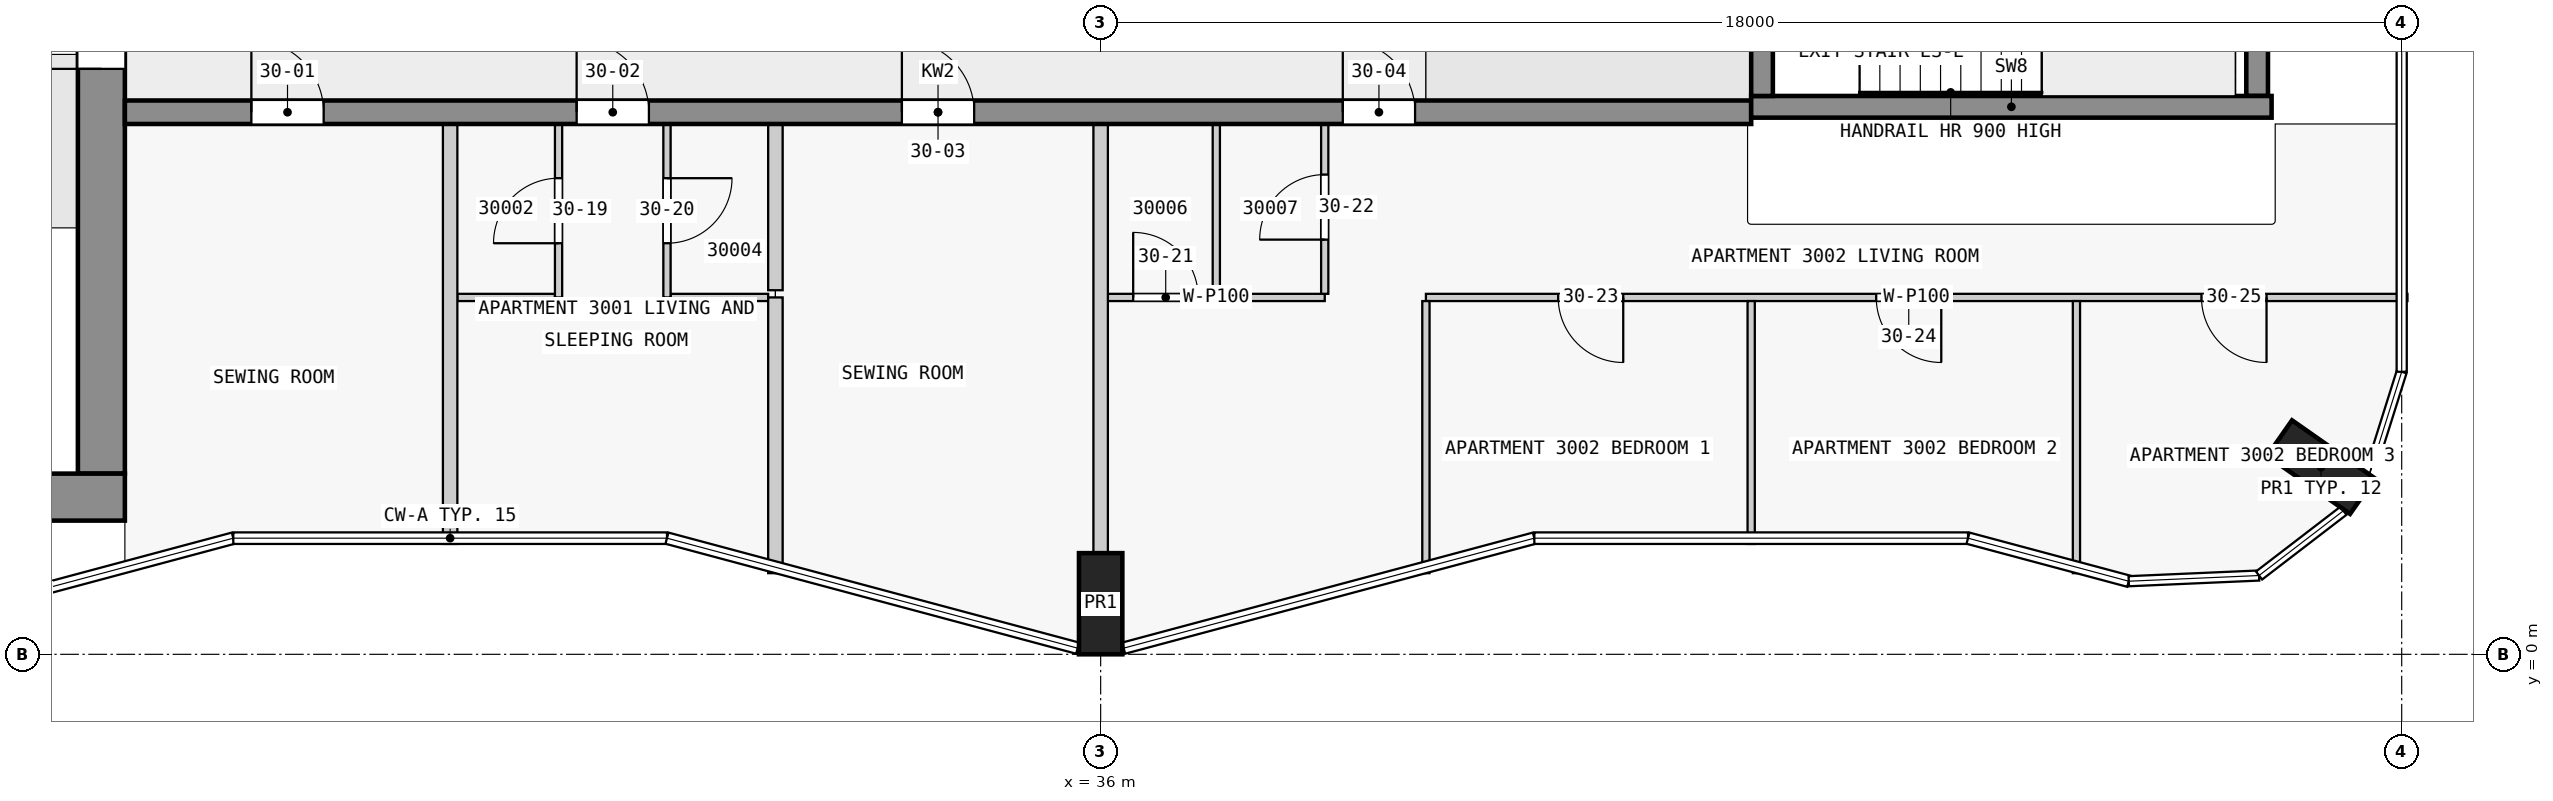
"""IFC4 building model, lengths in metres.
Left out: names, types, materials, properties, quantities, classifications, styles, units other than length and angle.
Written with IfcOpenShell. Run it as: python <this file> out.ifc"""

import sys

from ifc_helpers import new_model, si_unit, direction, frame, frame_2d, origin, origin_2d, place, context, subcontext, project, spatial, rectangle, extrude, element, fill, save


model = new_model("IFC4")
c1 = context("Model", 3, precision=1e-05, world=origin(), true_north=direction((0.0, 1.0)))
c2 = subcontext(c1, "Body", "Model", "MODEL_VIEW")
j1 = project(units=[si_unit("LENGTHUNIT", "METRE"), si_unit("PLANEANGLEUNIT", "RADIAN")], contexts=[c1])
p1 = place(None, origin())
s1 = spatial("IfcSite", under=j1, at=p1, CompositionType="ELEMENT")
p2 = place(p1, origin())
s2 = spatial("IfcBuilding", under=s1, at=p2, CompositionType="ELEMENT")
p3 = place(p2, frame((0.0, 0.0, 116.8)))
s3 = spatial("IfcBuildingStorey", under=s2, at=p3, CompositionType="ELEMENT", Elevation=116.8)
for number, where, z_axis, x_axis in (
    (1, (36.0, 0.7, 0.0), (0.0, 0.0, 1.0), (1.0, 0.0, 0.0)),
    (2, (52.884, 2.59, 0.0), (0.0, 0.0, 1.0), (0.574, 0.819, 0.0)),
):
    element("IfcColumn", number, at=place(p3, frame(where, z_axis=z_axis, x_axis=x_axis)), inside=s3, PredefinedType="COLUMN", context=c2, shape_type="SweptSolid", body=[
        extrude(rectangle(XDim=0.6, YDim=1.4, at=origin_2d()), origin(), (0.0, 0.0, 1.0), 3.5),
    ])
p4 = place(p3, frame((1.65, 2.175, 0.0), z_axis=(0.0, 0.0, 1.0), x_axis=(1.0, 0.0, 0.0)))
e3 = element("IfcWall", 3, at=p4, inside=s3, PredefinedType="SHEAR", context=c2, shape_type="SweptSolid", body=[
    extrude(rectangle(XDim=20.85, YDim=0.65, at=frame_2d((10.425, 0.0))), origin(), (0.0, 0.0, 1.0), 3.25),
])
p5 = place(p3, frame((22.175, 2.5, 0.0), z_axis=(0.0, 0.0, 1.0), x_axis=(0.0, 1.0, 0.0)))
e4 = element("IfcWall", 4, at=p5, inside=s3, PredefinedType="SHEAR", context=c2, shape_type="SweptSolid", body=[
    extrude(rectangle(XDim=14.85, YDim=0.65, at=frame_2d((7.425, 0.0))), origin(), (0.0, 0.0, 1.0), 3.25),
])
p6 = place(p5, frame((5.6, 0.0, 0.0)))
e5 = element("IfcOpeningElement", 5, at=p6, cuts=e4, PredefinedType="OPENING", context=c2, shape_type="SweptSolid", body=[
    extrude(rectangle(XDim=1.8, YDim=2.1, at=frame_2d((0.9, 1.05))), frame((0.0, 0.335, 0.0), z_axis=(0.0, -1.0, 0.0), x_axis=(1.0, 0.0, 0.0)), (0.0, 0.0, 1.0), 0.67),
])
p7 = place(p3, frame((45.15, 7.725, 0.0), z_axis=(0.0, 0.0, 1.0), x_axis=(0.0, 1.0, 0.0)))
e6 = element("IfcWall", 6, at=p7, inside=s3, PredefinedType="SHEAR", context=c2, shape_type="SweptSolid", body=[
    extrude(rectangle(XDim=2.55, YDim=0.3, at=frame_2d((1.275, 0.0))), origin(), (0.0, 0.0, 1.0), 3.5),
])
p8 = place(p7, frame((0.725, 0.0, 0.0)))
e7 = element("IfcOpeningElement", 7, at=p8, cuts=e6, PredefinedType="OPENING", context=c2, shape_type="SweptSolid", body=[
    extrude(rectangle(XDim=1.1, YDim=2.1, at=frame_2d((0.55, 1.05))), frame((0.0, 0.16, 0.0), z_axis=(0.0, -1.0, 0.0), x_axis=(1.0, 0.0, 0.0)), (0.0, 0.0, 1.0), 0.32),
])
p9 = place(p3, frame((52.0, 7.725, 0.0), z_axis=(0.0, 0.0, 1.0), x_axis=(0.0, 1.0, 0.0)))
e8 = element("IfcWall", 8, at=p9, inside=s3, PredefinedType="SHEAR", context=c2, shape_type="SweptSolid", body=[
    extrude(rectangle(XDim=2.55, YDim=0.3, at=frame_2d((1.275, 0.0))), origin(), (0.0, 0.0, 1.0), 3.5),
])
p10 = place(p3, frame((45.0, 7.575, 0.0), z_axis=(0.0, 0.0, 1.0), x_axis=(1.0, 0.0, 0.0)))
e9 = element("IfcWall", 9, at=p10, inside=s3, PredefinedType="SHEAR", context=c2, shape_type="SweptSolid", body=[
    extrude(rectangle(XDim=7.2, YDim=0.3, at=frame_2d((3.6, 0.0))), origin(), (0.0, 0.0, 1.0), 3.5),
])
p11 = place(p3, frame((22.5, 7.5, 0.0), z_axis=(0.0, 0.0, 1.0), x_axis=(1.0, 0.0, 0.0)))
e10 = element("IfcWall", 10, at=p11, inside=s3, PredefinedType="SHEAR", context=c2, shape_type="SweptSolid", body=[
    extrude(rectangle(XDim=22.5, YDim=0.325, at=frame_2d((11.25, 0.0))), origin(), (0.0, 0.0, 1.0), 3.25),
])
p12 = place(p11, frame((1.75, 0.0, 0.0)))
e11 = element("IfcOpeningElement", 11, at=p12, cuts=e10, PredefinedType="OPENING", context=c2, shape_type="SweptSolid", body=[
    extrude(rectangle(XDim=1.0, YDim=2.1, at=frame_2d((0.5, 1.05))), frame((0.0, 0.172, 0.0), z_axis=(0.0, -1.0, 0.0), x_axis=(1.0, 0.0, 0.0)), (0.0, 0.0, 1.0), 0.345),
])
p13 = place(p11, frame((6.25, 0.0, 0.0)))
e12 = element("IfcOpeningElement", 12, at=p13, cuts=e10, PredefinedType="OPENING", context=c2, shape_type="SweptSolid", body=[
    extrude(rectangle(XDim=1.0, YDim=2.1, at=frame_2d((0.5, 1.05))), frame((0.0, 0.172, 0.0), z_axis=(0.0, -1.0, 0.0), x_axis=(1.0, 0.0, 0.0)), (0.0, 0.0, 1.0), 0.345),
])
p14 = place(p11, frame((10.75, 0.0, 0.0)))
e13 = element("IfcOpeningElement", 13, at=p14, cuts=e10, PredefinedType="OPENING", context=c2, shape_type="SweptSolid", body=[
    extrude(rectangle(XDim=1.0, YDim=2.1, at=frame_2d((0.5, 1.05))), frame((0.0, 0.172, 0.0), z_axis=(0.0, -1.0, 0.0), x_axis=(1.0, 0.0, 0.0)), (0.0, 0.0, 1.0), 0.345),
])
p15 = place(p11, frame((16.85, 0.0, 0.0)))
e14 = element("IfcOpeningElement", 14, at=p15, cuts=e10, PredefinedType="OPENING", context=c2, shape_type="SweptSolid", body=[
    extrude(rectangle(XDim=1.0, YDim=2.1, at=frame_2d((0.5, 1.05))), frame((0.0, 0.172, 0.0), z_axis=(0.0, -1.0, 0.0), x_axis=(1.0, 0.0, 0.0)), (0.0, 0.0, 1.0), 0.345),
])
p16 = place(p3, frame((54.08, 4.938, 0.0), z_axis=(0.0, 0.0, 1.0), x_axis=(-1.0, 0.0, 0.0)))
e15 = element("IfcWall", 15, at=p16, inside=s3, PredefinedType="PARTITIONING", context=c2, shape_type="SweptSolid", body=[
    extrude(rectangle(XDim=13.58, YDim=0.1, at=frame_2d((6.79, 0.0))), origin(), (0.0, 0.0, 1.0), 3.25),
])
p17 = place(p16, frame((10.85, 0.0, 0.0)))
e16 = element("IfcOpeningElement", 16, at=p17, cuts=e15, PredefinedType="OPENING", context=c2, shape_type="SweptSolid", body=[
    extrude(rectangle(XDim=0.9, YDim=2.1, at=frame_2d((0.45, 1.05))), frame((0.0, 0.06, 0.0), z_axis=(0.0, -1.0, 0.0), x_axis=(1.0, 0.0, 0.0)), (0.0, 0.0, 1.0), 0.12),
])
p18 = place(p16, frame((6.45, 0.0, 0.0)))
e17 = element("IfcOpeningElement", 17, at=p18, cuts=e15, PredefinedType="OPENING", context=c2, shape_type="SweptSolid", body=[
    extrude(rectangle(XDim=0.9, YDim=2.1, at=frame_2d((0.45, 1.05))), frame((0.0, 0.06, 0.0), z_axis=(0.0, -1.0, 0.0), x_axis=(1.0, 0.0, 0.0)), (0.0, 0.0, 1.0), 0.12),
])
p19 = place(p16, frame((1.95, 0.0, 0.0)))
e18 = element("IfcOpeningElement", 18, at=p19, cuts=e15, PredefinedType="OPENING", context=c2, shape_type="SweptSolid", body=[
    extrude(rectangle(XDim=0.9, YDim=2.1, at=frame_2d((0.45, 1.05))), frame((0.0, 0.06, 0.0), z_axis=(0.0, -1.0, 0.0), x_axis=(1.0, 0.0, 0.0)), (0.0, 0.0, 1.0), 0.12),
])
for number, where, z_axis, x_axis in (
    (19, (27.1, 4.938, 0.0), (0.0, 0.0, 1.0), (1.0, 0.0, 0.0)),
    (20, (30.05, 4.938, 0.0), (0.0, 0.0, 1.0), (1.0, 0.0, 0.0)),
):
    element("IfcWall", number, at=place(p3, frame(where, z_axis=z_axis, x_axis=x_axis)), inside=s3, PredefinedType="PARTITIONING", context=c2, shape_type="SweptSolid", body=[
        extrude(rectangle(XDim=1.35, YDim=0.1, at=frame_2d((0.675, 0.0))), origin(), (0.0, 0.0, 1.0), 3.25),
    ])
p20 = place(p3, frame((36.1, 4.938, 0.0), z_axis=(0.0, 0.0, 1.0), x_axis=(1.0, 0.0, 0.0)))
e21 = element("IfcWall", 21, at=p20, inside=s3, PredefinedType="PARTITIONING", context=c2, shape_type="SweptSolid", body=[
    extrude(rectangle(XDim=3.0, YDim=0.1, at=frame_2d((1.5, 0.0))), origin(), (0.0, 0.0, 1.0), 3.25),
])
p21 = place(p20, frame((0.35, 0.0, 0.0)))
e22 = element("IfcOpeningElement", 22, at=p21, cuts=e21, PredefinedType="OPENING", context=c2, shape_type="SweptSolid", body=[
    extrude(rectangle(XDim=0.9, YDim=2.1, at=frame_2d((0.45, 1.05))), frame((0.0, 0.06, 0.0), z_axis=(0.0, -1.0, 0.0), x_axis=(1.0, 0.0, 0.0)), (0.0, 0.0, 1.0), 0.12),
])
p22 = place(p3, frame((27.0, 1.527, 0.0), z_axis=(0.0, 0.0, 1.0), x_axis=(0.0, 1.0, 0.0)))
e23 = element("IfcWall", 23, at=p22, inside=s3, PredefinedType="PARTITIONING", context=c2, shape_type="SweptSolid", body=[
    extrude(rectangle(XDim=5.811, YDim=0.2, at=frame_2d((2.905, 0.0))), origin(), (0.0, 0.0, 1.0), 3.25),
])
p23 = place(p3, frame((28.5, 4.938, 0.0), z_axis=(0.0, 0.0, 1.0), x_axis=(0.0, 1.0, 0.0)))
e24 = element("IfcWall", 24, at=p23, inside=s3, PredefinedType="PARTITIONING", context=c2, shape_type="SweptSolid", body=[
    extrude(rectangle(XDim=2.4, YDim=0.1, at=frame_2d((1.2, 0.0))), origin(), (0.0, 0.0, 1.0), 3.25),
])
p24 = place(p23, frame((0.75, 0.0, 0.0)))
e25 = element("IfcOpeningElement", 25, at=p24, cuts=e24, PredefinedType="OPENING", context=c2, shape_type="SweptSolid", body=[
    extrude(rectangle(XDim=0.9, YDim=2.1, at=frame_2d((0.45, 1.05))), frame((0.0, 0.06, 0.0), z_axis=(0.0, -1.0, 0.0), x_axis=(1.0, 0.0, 0.0)), (0.0, 0.0, 1.0), 0.12),
])
p25 = place(p3, frame((30.0, 7.337, 0.0), z_axis=(0.0, 0.0, 1.0), x_axis=(0.0, -1.0, 0.0)))
e26 = element("IfcWall", 26, at=p25, inside=s3, PredefinedType="PARTITIONING", context=c2, shape_type="SweptSolid", body=[
    extrude(rectangle(XDim=2.4, YDim=0.1, at=frame_2d((1.2, 0.0))), origin(), (0.0, 0.0, 1.0), 3.25),
])
p26 = place(p25, frame((0.75, 0.0, 0.0)))
e27 = element("IfcOpeningElement", 27, at=p26, cuts=e26, PredefinedType="OPENING", context=c2, shape_type="SweptSolid", body=[
    extrude(rectangle(XDim=0.9, YDim=2.1, at=frame_2d((0.45, 1.05))), frame((0.0, 0.06, 0.0), z_axis=(0.0, -1.0, 0.0), x_axis=(1.0, 0.0, 0.0)), (0.0, 0.0, 1.0), 0.12),
])
p27 = place(p3, frame((31.5, 4.938, 0.0), z_axis=(0.0, 0.0, 1.0), x_axis=(0.0, -1.0, 0.0)))
e28 = element("IfcWall", 28, at=p27, inside=s3, PredefinedType="PARTITIONING", context=c2, shape_type="SweptSolid", body=[
    extrude(rectangle(XDim=3.815, YDim=0.2, at=frame_2d((1.908, 0.0))), origin(), (0.0, 0.0, 1.0), 3.25),
])
p28 = place(p3, frame((31.5, 5.038, 0.0), z_axis=(0.0, 0.0, 1.0), x_axis=(0.0, 1.0, 0.0)))
e29 = element("IfcWall", 29, at=p28, inside=s3, PredefinedType="PARTITIONING", context=c2, shape_type="SweptSolid", body=[
    extrude(rectangle(XDim=2.3, YDim=0.2, at=frame_2d((1.15, 0.0))), origin(), (0.0, 0.0, 1.0), 3.25),
])
p29 = place(p3, frame((36.0, 1.4, 0.0), z_axis=(0.0, 0.0, 1.0), x_axis=(0.0, 1.0, 0.0)))
e30 = element("IfcWall", 30, at=p29, inside=s3, PredefinedType="PARTITIONING", context=c2, shape_type="SweptSolid", body=[
    extrude(rectangle(XDim=5.938, YDim=0.2, at=frame_2d((2.969, 0.0))), origin(), (0.0, 0.0, 1.0), 3.25),
])
p30 = place(p3, frame((37.6, 4.988, 0.0), z_axis=(0.0, 0.0, 1.0), x_axis=(0.0, 1.0, 0.0)))
e31 = element("IfcWall", 31, at=p30, inside=s3, PredefinedType="PARTITIONING", context=c2, shape_type="SweptSolid", body=[
    extrude(rectangle(XDim=2.35, YDim=0.1, at=frame_2d((1.175, 0.0))), origin(), (0.0, 0.0, 1.0), 3.25),
])
p31 = place(p3, frame((39.1, 4.988, 0.0), z_axis=(0.0, 0.0, 1.0), x_axis=(0.0, 1.0, 0.0)))
e32 = element("IfcWall", 32, at=p31, inside=s3, PredefinedType="PARTITIONING", context=c2, shape_type="SweptSolid", body=[
    extrude(rectangle(XDim=2.35, YDim=0.1, at=frame_2d((1.175, 0.0))), origin(), (0.0, 0.0, 1.0), 3.25),
])
p32 = place(p31, frame((0.75, 0.0, 0.0)))
e33 = element("IfcOpeningElement", 33, at=p32, cuts=e32, PredefinedType="OPENING", context=c2, shape_type="SweptSolid", body=[
    extrude(rectangle(XDim=0.9, YDim=2.1, at=frame_2d((0.45, 1.05))), frame((0.0, 0.06, 0.0), z_axis=(0.0, -1.0, 0.0), x_axis=(1.0, 0.0, 0.0)), (0.0, 0.0, 1.0), 0.12),
])
p33 = place(p3, frame((40.5, 4.887, 0.0), z_axis=(0.0, 0.0, 1.0), x_axis=(0.0, -1.0, 0.0)))
e34 = element("IfcWall", 34, at=p33, inside=s3, PredefinedType="PARTITIONING", context=c2, shape_type="SweptSolid", body=[
    extrude(rectangle(XDim=3.765, YDim=0.1, at=frame_2d((1.883, 0.0))), origin(), (0.0, 0.0, 1.0), 3.25),
])
p34 = place(p3, frame((45.0, 1.527, 0.0), z_axis=(0.0, 0.0, 1.0), x_axis=(0.0, 1.0, 0.0)))
e35 = element("IfcWall", 35, at=p34, inside=s3, PredefinedType="PARTITIONING", context=c2, shape_type="SweptSolid", body=[
    extrude(rectangle(XDim=3.361, YDim=0.1, at=frame_2d((1.68, 0.0))), origin(), (0.0, 0.0, 1.0), 3.25),
])
p35 = place(p3, frame((49.5, 1.122, 0.0), z_axis=(0.0, 0.0, 1.0), x_axis=(0.0, 1.0, 0.0)))
e36 = element("IfcWall", 36, at=p35, inside=s3, PredefinedType="PARTITIONING", context=c2, shape_type="SweptSolid", body=[
    extrude(rectangle(XDim=3.765, YDim=0.1, at=frame_2d((1.883, 0.0))), origin(), (0.0, 0.0, 1.0), 3.25),
])
p36 = place(p6, origin())
e37 = element("IfcDoor", 37, at=p36, inside=s3, OperationType="DOUBLE_DOOR_SINGLE_SWING", PredefinedType="DOOR", context=c2, shape_type="SweptSolid", body=[
    extrude(rectangle(XDim=1.8, YDim=2.1, at=frame_2d((0.9, 1.05))), frame((0.0, 0.025, 0.0), z_axis=(0.0, -1.0, 0.0), x_axis=(1.0, 0.0, 0.0)), (0.0, 0.0, 1.0), 0.05),
])
fill(e5, e37)
p37 = place(p12, origin())
e38 = element("IfcDoor", 38, at=p37, inside=s3, OperationType="SINGLE_SWING_LEFT", PredefinedType="DOOR", context=c2, shape_type="SweptSolid", body=[
    extrude(rectangle(XDim=1.0, YDim=2.1, at=frame_2d((0.5, 1.05))), frame((0.0, 0.025, 0.0), z_axis=(0.0, -1.0, 0.0), x_axis=(1.0, 0.0, 0.0)), (0.0, 0.0, 1.0), 0.05),
])
fill(e11, e38)
p38 = place(p13, origin())
e39 = element("IfcDoor", 39, at=p38, inside=s3, OperationType="SINGLE_SWING_LEFT", PredefinedType="DOOR", context=c2, shape_type="SweptSolid", body=[
    extrude(rectangle(XDim=1.0, YDim=2.1, at=frame_2d((0.5, 1.05))), frame((0.0, 0.025, 0.0), z_axis=(0.0, -1.0, 0.0), x_axis=(1.0, 0.0, 0.0)), (0.0, 0.0, 1.0), 0.05),
])
fill(e12, e39)
p39 = place(p14, origin())
e40 = element("IfcDoor", 40, at=p39, inside=s3, OperationType="SINGLE_SWING_LEFT", PredefinedType="DOOR", context=c2, shape_type="SweptSolid", body=[
    extrude(rectangle(XDim=1.0, YDim=2.1, at=frame_2d((0.5, 1.05))), frame((0.0, 0.025, 0.0), z_axis=(0.0, -1.0, 0.0), x_axis=(1.0, 0.0, 0.0)), (0.0, 0.0, 1.0), 0.05),
])
fill(e13, e40)
p40 = place(p15, origin())
e41 = element("IfcDoor", 41, at=p40, inside=s3, OperationType="SINGLE_SWING_RIGHT", PredefinedType="DOOR", context=c2, shape_type="SweptSolid", body=[
    extrude(rectangle(XDim=1.0, YDim=2.1, at=frame_2d((0.5, 1.05))), frame((0.0, 0.025, 0.0), z_axis=(0.0, -1.0, 0.0), x_axis=(1.0, 0.0, 0.0)), (0.0, 0.0, 1.0), 0.05),
])
fill(e14, e41)
p41 = place(p24, origin())
e42 = element("IfcDoor", 42, at=p41, inside=s3, OperationType="SINGLE_SWING_LEFT", PredefinedType="DOOR", context=c2, shape_type="SweptSolid", body=[
    extrude(rectangle(XDim=0.9, YDim=2.1, at=frame_2d((0.45, 1.05))), frame((0.0, 0.025, 0.0), z_axis=(0.0, -1.0, 0.0), x_axis=(1.0, 0.0, 0.0)), (0.0, 0.0, 1.0), 0.05),
])
fill(e25, e42)
p42 = place(p26, origin())
e43 = element("IfcDoor", 43, at=p42, inside=s3, OperationType="SINGLE_SWING_LEFT", PredefinedType="DOOR", context=c2, shape_type="SweptSolid", body=[
    extrude(rectangle(XDim=0.9, YDim=2.1, at=frame_2d((0.45, 1.05))), frame((0.0, 0.025, 0.0), z_axis=(0.0, -1.0, 0.0), x_axis=(1.0, 0.0, 0.0)), (0.0, 0.0, 1.0), 0.05),
])
fill(e27, e43)
p43 = place(p21, origin())
e44 = element("IfcDoor", 44, at=p43, inside=s3, OperationType="SINGLE_SWING_LEFT", PredefinedType="DOOR", context=c2, shape_type="SweptSolid", body=[
    extrude(rectangle(XDim=0.9, YDim=2.1, at=frame_2d((0.45, 1.05))), frame((0.0, 0.025, 0.0), z_axis=(0.0, -1.0, 0.0), x_axis=(1.0, 0.0, 0.0)), (0.0, 0.0, 1.0), 0.05),
])
fill(e22, e44)
p44 = place(p32, origin())
e45 = element("IfcDoor", 45, at=p44, inside=s3, OperationType="SINGLE_SWING_RIGHT", PredefinedType="DOOR", context=c2, shape_type="SweptSolid", body=[
    extrude(rectangle(XDim=0.9, YDim=2.1, at=frame_2d((0.45, 1.05))), frame((0.0, 0.025, 0.0), z_axis=(0.0, -1.0, 0.0), x_axis=(1.0, 0.0, 0.0)), (0.0, 0.0, 1.0), 0.05),
])
fill(e33, e45)
p45 = place(p17, origin())
e46 = element("IfcDoor", 46, at=p45, inside=s3, OperationType="SINGLE_SWING_RIGHT", PredefinedType="DOOR", context=c2, shape_type="SweptSolid", body=[
    extrude(rectangle(XDim=0.9, YDim=2.1, at=frame_2d((0.45, 1.05))), frame((0.0, 0.025, 0.0), z_axis=(0.0, -1.0, 0.0), x_axis=(1.0, 0.0, 0.0)), (0.0, 0.0, 1.0), 0.05),
])
fill(e16, e46)
p46 = place(p18, origin())
e47 = element("IfcDoor", 47, at=p46, inside=s3, OperationType="SINGLE_SWING_RIGHT", PredefinedType="DOOR", context=c2, shape_type="SweptSolid", body=[
    extrude(rectangle(XDim=0.9, YDim=2.1, at=frame_2d((0.45, 1.05))), frame((0.0, 0.025, 0.0), z_axis=(0.0, -1.0, 0.0), x_axis=(1.0, 0.0, 0.0)), (0.0, 0.0, 1.0), 0.05),
])
fill(e17, e47)
p47 = place(p19, origin())
e48 = element("IfcDoor", 48, at=p47, inside=s3, OperationType="SINGLE_SWING_LEFT", PredefinedType="DOOR", context=c2, shape_type="SweptSolid", body=[
    extrude(rectangle(XDim=0.9, YDim=2.1, at=frame_2d((0.45, 1.05))), frame((0.0, 0.025, 0.0), z_axis=(0.0, -1.0, 0.0), x_axis=(1.0, 0.0, 0.0)), (0.0, 0.0, 1.0), 0.05),
])
fill(e18, e48)
save(model, sys.argv[1])
